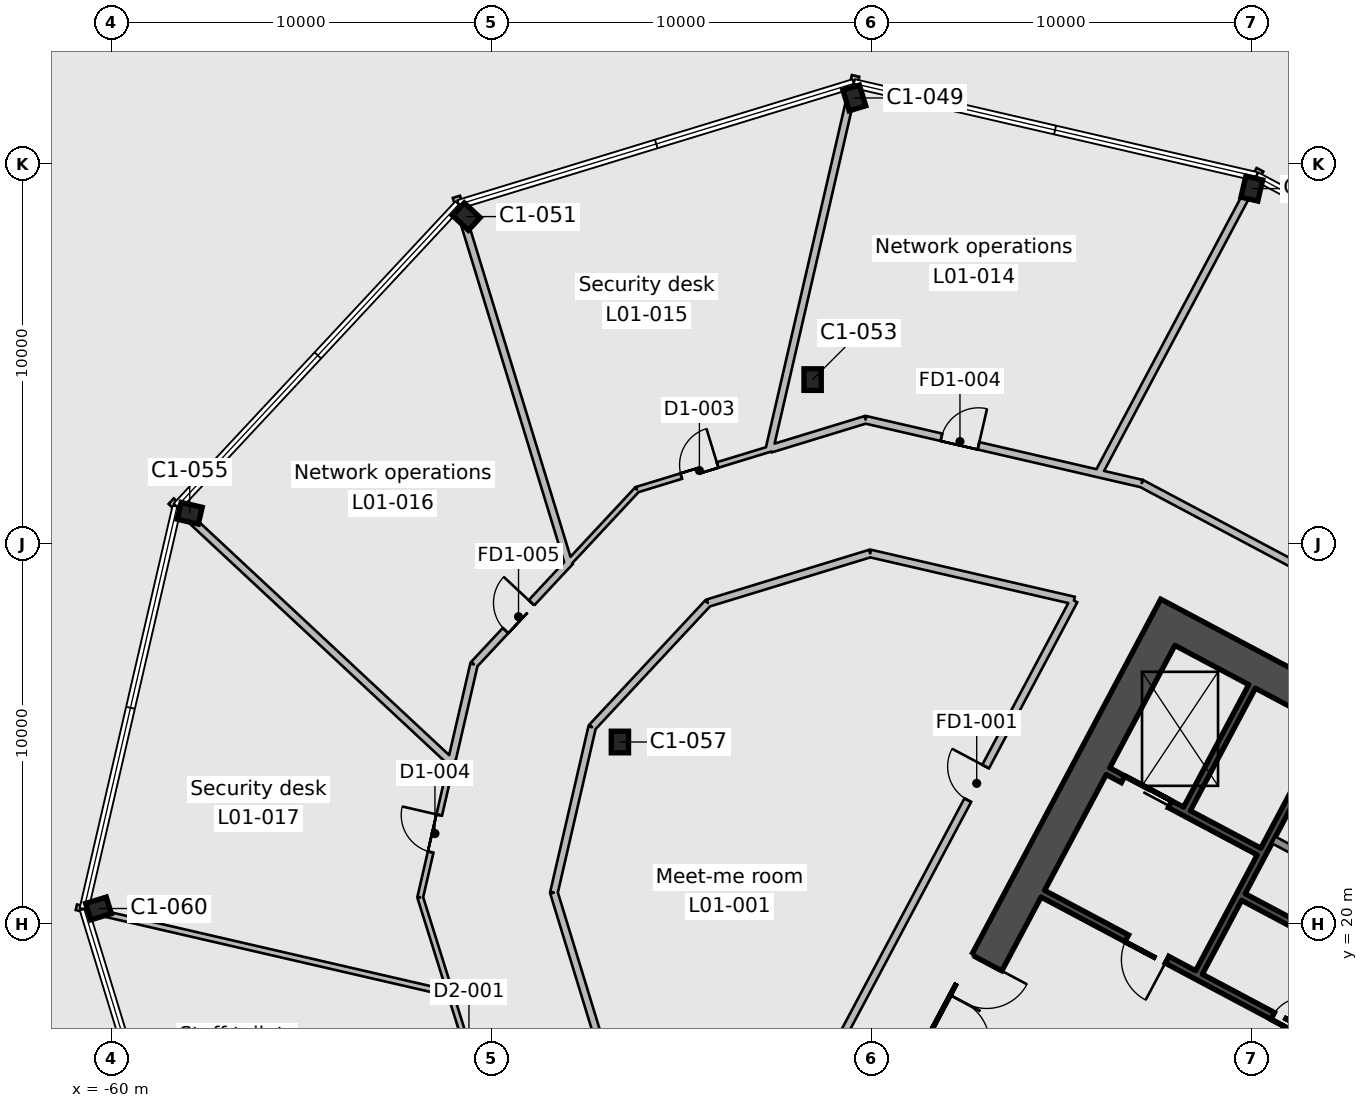
"""IFC4 building model, lengths in metres.
Left out: names, types, materials, properties, quantities, classifications, styles, units other than length and angle.
Written with IfcOpenShell. Run it as: python <this file> out.ifc"""

import sys

from ifc_helpers import new_model, si_unit, direction, frame, frame_2d, origin, origin_2d, place, context, subcontext, project, spatial, rectangle, i_section, extrude, element, fill, save


model = new_model("IFC4")
c1 = context("Model", 3, precision=1e-05, world=origin(), true_north=direction((0.0, 1.0)))
c2 = subcontext(c1, "Body", "Model", "MODEL_VIEW")
j1 = project(units=[si_unit("LENGTHUNIT", "METRE"), si_unit("PLANEANGLEUNIT", "RADIAN")], contexts=[c1])
p1 = place(None, origin())
s1 = spatial("IfcSite", under=j1, at=p1, CompositionType="ELEMENT")
p2 = place(p1, origin())
s2 = spatial("IfcBuilding", under=s1, at=p2, CompositionType="ELEMENT")
p3 = place(p2, frame((0.0, 0.0, 7.0)))
s3 = spatial("IfcBuildingStorey", under=s2, at=p3, CompositionType="ELEMENT", Elevation=7.0)
for number, where, z_axis, x_axis in (
    (1, (-60.34, 20.407, 0.0), (0.0, 0.0, 1.0), (0.292, -0.956, 0.0)),
    (2, (-46.62, 24.788, 0.0), (0.0, 0.0, 1.0), (1.0, 0.0, 0.0)),
    (3, (-57.939, 30.807, 0.0), (0.0, 0.0, 1.0), (-0.225, -0.974, 0.0)),
    (4, (-41.549, 34.324, 0.0), (0.0, 0.0, 1.0), (1.0, 0.0, 0.0)),
    (5, (-50.66, 38.613, 0.0), (0.0, 0.0, 1.0), (-0.682, -0.731, 0.0)),
    (6, (-29.993, 39.35, 0.0), (0.0, 0.0, 1.0), (-0.974, 0.225, 0.0)),
    (7, (-40.452, 41.734, 0.0), (0.0, 0.0, 1.0), (-0.956, -0.292, 0.0)),
):
    element("IfcColumn", number, at=place(p3, frame(where, z_axis=z_axis, x_axis=x_axis)), inside=s3, PredefinedType="COLUMN", context=c2, shape_type="SweptSolid", body=[
        extrude(i_section(OverallWidth=0.455, OverallDepth=0.569, WebThickness=0.078, FlangeThickness=0.125, FilletRadius=0.015, at=origin_2d()), origin(), (0.0, 0.0, 1.0), 5.2),
    ])
p4 = place(p3, frame((-31.992, 28.336, 0.0), z_axis=(0.0, 0.0, 1.0), x_axis=(-0.46947084998, -0.882947971864, 0.0)))
e8 = element("IfcWall", 8, at=p4, inside=s3, PredefinedType="SHEAR", context=c2, shape_type="SweptSolid", body=[
    extrude(rectangle(XDim=20.0, YDim=0.9, at=frame_2d((10.0, 0.0))), origin(), (0.0, 0.0, 1.0), 5.2),
])
p5 = place(p4, frame((10.6, 0.0, 0.0)))
e9 = element("IfcOpeningElement", 9, at=p5, cuts=e8, PredefinedType="OPENING", context=c2, shape_type="SweptSolid", body=[
    extrude(rectangle(XDim=2.4, YDim=2.4, at=frame_2d((1.2, 1.2))), frame((0.0, 0.46, 0.0), z_axis=(0.0, -1.0, 0.0), x_axis=(1.0, 0.0, 0.0)), (0.0, 0.0, 1.0), 0.92),
])
p6 = place(p3, frame((-13.97, 18.244, 0.0), z_axis=(0.0, 0.0, 1.0), x_axis=(-0.88294509198, 0.469476266226, 0.0)))
e10 = element("IfcWall", 10, at=p6, inside=s3, PredefinedType="SHEAR", context=c2, shape_type="SweptSolid", body=[
    extrude(rectangle(XDim=20.2, YDim=0.9, at=frame_2d((10.1, 0.0))), origin(), (0.0, 0.0, 1.0), 5.2),
])
p7 = place(p3, frame((-27.955, 25.171, 0.0), z_axis=(0.0, 0.0, 1.0), x_axis=(-0.469480409012, -0.88294288918, 0.0)))
e11 = element("IfcWall", 11, at=p7, inside=s3, PredefinedType="SHEAR", context=c2, shape_type="SweptSolid", body=[
    extrude(rectangle(XDim=7.3, YDim=0.2, at=frame_2d((3.65, 0.0))), origin(), (0.0, 0.0, 1.0), 5.2),
])
p8 = place(p3, frame((-29.986, 26.25, 0.0), z_axis=(0.0, 0.0, 1.0), x_axis=(-0.469494272526, -0.882935517501, 0.0)))
e12 = element("IfcWall", 12, at=p8, inside=s3, PredefinedType="SHEAR", context=c2, shape_type="SweptSolid", body=[
    extrude(rectangle(XDim=3.65, YDim=0.2, at=frame_2d((1.825, 0.0))), origin(), (0.0, 0.0, 1.0), 5.2),
])
p9 = place(p3, frame((-24.825, 19.769, 0.0), z_axis=(0.0, 0.0, 1.0), x_axis=(-0.882934506056, 0.469496174655, 0.0)))
e13 = element("IfcWall", 13, at=p9, inside=s3, PredefinedType="SOLIDWALL", context=c2, shape_type="SweptSolid", body=[
    extrude(rectangle(XDim=5.2, YDim=0.2, at=frame_2d((2.6, 0.0))), origin(), (0.0, 0.0, 1.0), 5.2),
])
p10 = place(p3, frame((-29.804, 21.906, 0.0), z_axis=(0.0, 0.0, 1.0), x_axis=(-0.882960433586, 0.469447412093, 0.0)))
e14 = element("IfcWall", 14, at=p10, inside=s3, PredefinedType="SHEAR", context=c2, shape_type="SweptSolid", body=[
    extrude(rectangle(XDim=4.5, YDim=0.2, at=frame_2d((2.25, 0.0))), origin(), (0.0, 0.0, 1.0), 5.2),
])
p11 = place(p10, frame((2.65, 0.0, 0.0)))
e15 = element("IfcOpeningElement", 15, at=p11, cuts=e14, PredefinedType="OPENING", context=c2, shape_type="SweptSolid", body=[
    extrude(rectangle(XDim=1.4, YDim=2.4, at=frame_2d((0.7, 1.2))), frame((0.0, 0.11, 0.0), z_axis=(0.0, -1.0, 0.0), x_axis=(1.0, 0.0, 0.0)), (0.0, 0.0, 1.0), 0.22),
])
p12 = place(p3, frame((-25.623, 18.268, 0.0), z_axis=(0.0, 0.0, 1.0), x_axis=(-0.882953967957, 0.469459572775, 0.0)))
e16 = element("IfcWall", 16, at=p12, inside=s3, PredefinedType="SHEAR", context=c2, shape_type="SweptSolid", body=[
    extrude(rectangle(XDim=5.2, YDim=0.2, at=frame_2d((2.6, 0.0))), origin(), (0.0, 0.0, 1.0), 5.2),
])
p13 = place(p3, frame((-26.662, 16.102, 0.0), z_axis=(0.0, 0.0, 1.0), x_axis=(-0.882940221191, 0.469485426614, 0.0)))
e17 = element("IfcWall", 17, at=p13, inside=s3, PredefinedType="SHEAR", context=c2, shape_type="SweptSolid", body=[
    extrude(rectangle(XDim=10.0, YDim=0.2, at=frame_2d((5.0, 0.0))), origin(), (0.0, 0.0, 1.0), 5.2),
])
p14 = place(p13, frame((6.3, 0.0, 0.0)))
e18 = element("IfcOpeningElement", 18, at=p14, cuts=e17, PredefinedType="OPENING", context=c2, shape_type="SweptSolid", body=[
    extrude(rectangle(XDim=1.2, YDim=2.1, at=frame_2d((0.6, 1.05))), frame((0.0, 0.11, 0.0), z_axis=(0.0, -1.0, 0.0), x_axis=(1.0, 0.0, 0.0)), (0.0, 0.0, 1.0), 0.22),
])
p15 = place(p13, frame((2.25, 0.0, 0.0)))
e19 = element("IfcOpeningElement", 19, at=p15, cuts=e17, PredefinedType="OPENING", context=c2, shape_type="SweptSolid", body=[
    extrude(rectangle(XDim=0.9, YDim=2.1, at=frame_2d((0.45, 1.05))), frame((0.0, 0.11, 0.0), z_axis=(0.0, -1.0, 0.0), x_axis=(1.0, 0.0, 0.0)), (0.0, 0.0, 1.0), 0.22),
])
p16 = place(p3, frame((-51.08, 18.168, 0.0), z_axis=(0.0, 0.0, 1.0), x_axis=(-0.974375306075, 0.224928350615, 0.0)))
e20 = element("IfcWall", 20, at=p16, inside=s3, PredefinedType="PARTITIONING", context=c2, shape_type="SweptSolid", body=[
    extrude(rectangle(XDim=10.101, YDim=0.15, at=frame_2d((5.05, 0.0))), origin(), (0.0, 0.0, 1.0), 4.75),
])
p17 = place(p3, frame((-58.427, 31.125, 0.0), z_axis=(0.0, 0.0, 1.0), x_axis=(0.731473963822, -0.681869371838, 0.0)))
e21 = element("IfcWall", 21, at=p17, inside=s3, PredefinedType="PARTITIONING", context=c2, shape_type="SweptSolid", body=[
    extrude(rectangle(XDim=10.08, YDim=0.2, at=frame_2d((5.04, 0.0))), origin(), (0.0, 0.0, 1.0), 4.75),
])
p18 = place(p3, frame((-51.041, 24.311, 0.0), z_axis=(0.0, 0.0, 1.0), x_axis=(-0.224893203367, -0.974383418927, 0.0)))
e22 = element("IfcWall", 22, at=p18, inside=s3, PredefinedType="PARTITIONING", context=c2, shape_type="SweptSolid", body=[
    extrude(rectangle(XDim=3.704, YDim=0.15, at=frame_2d((1.852, 0.0))), origin(), (0.0, 0.0, 1.0), 4.75),
])
p19 = place(p18, frame((1.482, 0.0, 0.0)))
e23 = element("IfcOpeningElement", 23, at=p19, cuts=e22, PredefinedType="OPENING", context=c2, shape_type="SweptSolid", body=[
    extrude(rectangle(XDim=1.0, YDim=2.1, at=frame_2d((0.5, 1.05))), frame((0.0, 0.085, 0.0), z_axis=(0.0, -1.0, 0.0), x_axis=(1.0, 0.0, 0.0)), (0.0, 0.0, 1.0), 0.17),
])
p20 = place(p3, frame((-51.874, 20.702, 0.0), z_axis=(0.0, 0.0, 1.0), x_axis=(0.299019355328, -0.954247046178, 0.0)))
e24 = element("IfcWall", 24, at=p20, inside=s3, PredefinedType="PARTITIONING", context=c2, shape_type="SweptSolid", body=[
    extrude(rectangle(XDim=2.595, YDim=0.15, at=frame_2d((1.298, 0.0))), origin(), (0.0, 0.0, 1.0), 4.75),
])
p21 = place(p3, frame((-49.847, 14.234, 0.0), z_axis=(0.0, 0.0, 1.0), x_axis=(-0.29896287329, 0.954264743346, 0.0)))
e25 = element("IfcWall", 25, at=p21, inside=s3, PredefinedType="PARTITIONING", context=c2, shape_type="SweptSolid", body=[
    extrude(rectangle(XDim=4.183, YDim=0.15, at=frame_2d((2.091, 0.0))), origin(), (0.0, 0.0, 1.0), 4.75),
])
p22 = place(p21, frame((2.015, 0.0, 0.0)))
e26 = element("IfcOpeningElement", 26, at=p22, cuts=e25, PredefinedType="OPENING", context=c2, shape_type="SweptSolid", body=[
    extrude(rectangle(XDim=0.95, YDim=2.1, at=frame_2d((0.475, 1.05))), frame((0.0, 0.085, 0.0), z_axis=(0.0, -1.0, 0.0), x_axis=(1.0, 0.0, 0.0)), (0.0, 0.0, 1.0), 0.17),
])
p23 = place(p3, frame((-47.933, 29.538, 0.0), z_axis=(0.0, 0.0, 1.0), x_axis=(-0.682088017664, -0.731270084277, 0.0)))
e27 = element("IfcWall", 27, at=p23, inside=s3, PredefinedType="PARTITIONING", context=c2, shape_type="SweptSolid", body=[
    extrude(rectangle(XDim=3.703, YDim=0.2, at=frame_2d((1.852, 0.0))), origin(), (0.0, 0.0, 1.0), 4.75),
])
p24 = place(p23, frame((1.486, 0.0, 0.0)))
e28 = element("IfcOpeningElement", 28, at=p24, cuts=e27, PredefinedType="OPENING", context=c2, shape_type="SweptSolid", body=[
    extrude(rectangle(XDim=1.0, YDim=2.1, at=frame_2d((0.5, 1.05))), frame((0.0, 0.11, 0.0), z_axis=(0.0, -1.0, 0.0), x_axis=(1.0, 0.0, 0.0)), (0.0, 0.0, 1.0), 0.22),
])
p25 = place(p3, frame((-50.459, 26.83, 0.0), z_axis=(0.0, 0.0, 1.0), x_axis=(-0.225121568864, -0.974330682691, 0.0)))
e29 = element("IfcWall", 29, at=p25, inside=s3, PredefinedType="PARTITIONING", context=c2, shape_type="SweptSolid", body=[
    extrude(rectangle(XDim=2.585, YDim=0.2, at=frame_2d((1.293, 0.0))), origin(), (0.0, 0.0, 1.0), 4.75),
])
p26 = place(p3, frame((-50.922, 39.133, 0.0), z_axis=(0.0, 0.0, 1.0), x_axis=(0.292463432429, -0.956276707178, 0.0)))
e30 = element("IfcWall", 30, at=p26, inside=s3, PredefinedType="PARTITIONING", context=c2, shape_type="SweptSolid", body=[
    extrude(rectangle(XDim=10.08, YDim=0.2, at=frame_2d((5.04, 0.0))), origin(), (0.0, 0.0, 1.0), 4.75),
])
p27 = place(p3, frame((-48.138, 21.768, 0.0), z_axis=(0.0, 0.0, 1.0), x_axis=(0.224910471472, 0.974379433189, 0.0)))
e31 = element("IfcWall", 31, at=p27, inside=s3, PredefinedType="PARTITIONING", context=c2, shape_type="SweptSolid", body=[
    extrude(rectangle(XDim=3.499, YDim=0.2, at=frame_2d((1.749, 0.0))), origin(), (0.0, 0.0, 1.0), 4.75),
])
p28 = place(p3, frame((-47.351, 25.177, 0.0), z_axis=(0.0, 0.0, 1.0), x_axis=(0.681950982626, 0.731397878925, 0.0)))
e32 = element("IfcWall", 32, at=p28, inside=s3, PredefinedType="PARTITIONING", context=c2, shape_type="SweptSolid", body=[
    extrude(rectangle(XDim=2.464, YDim=0.2, at=frame_2d((1.232, 0.0))), origin(), (0.0, 0.0, 1.0), 4.75),
])
p29 = place(p3, frame((-47.05, 16.554, 0.0), z_axis=(0.0, 0.0, 1.0), x_axis=(-0.292399072869, 0.956296388253, 0.0)))
e33 = element("IfcWall", 33, at=p29, inside=s3, PredefinedType="PARTITIONING", context=c2, shape_type="SweptSolid", body=[
    extrude(rectangle(XDim=4.466, YDim=0.2, at=frame_2d((2.233, 0.0))), origin(), (0.0, 0.0, 1.0), 4.75),
])
p30 = place(p3, frame((-48.356, 20.825, 0.0), z_axis=(0.0, 0.0, 1.0), x_axis=(0.225227894395, 0.974306109796, 0.0)))
e34 = element("IfcWall", 34, at=p30, inside=s3, PredefinedType="PARTITIONING", context=c2, shape_type="SweptSolid", body=[
    extrude(rectangle(XDim=0.968, YDim=0.2, at=frame_2d((0.484, 0.0))), origin(), (0.0, 0.0, 1.0), 4.75),
])
p31 = place(p3, frame((-42.653, 32.504, 0.0), z_axis=(0.0, 0.0, 1.0), x_axis=(-0.95632425254, -0.292307926687, 0.0)))
e35 = element("IfcWall", 35, at=p31, inside=s3, PredefinedType="PARTITIONING", context=c2, shape_type="SweptSolid", body=[
    extrude(rectangle(XDim=3.677, YDim=0.15, at=frame_2d((1.839, 0.0))), origin(), (0.0, 0.0, 1.0), 4.75),
])
p32 = place(p31, frame((1.461, 0.0, 0.0)))
e36 = element("IfcOpeningElement", 36, at=p32, cuts=e35, PredefinedType="OPENING", context=c2, shape_type="SweptSolid", body=[
    extrude(rectangle(XDim=1.0, YDim=2.1, at=frame_2d((0.5, 1.05))), frame((0.0, 0.085, 0.0), z_axis=(0.0, -1.0, 0.0), x_axis=(1.0, 0.0, 0.0)), (0.0, 0.0, 1.0), 0.17),
])
p33 = place(p3, frame((-46.17, 31.429, 0.0), z_axis=(0.0, 0.0, 1.0), x_axis=(-0.68198172509, -0.731369213628, 0.0)))
e37 = element("IfcWall", 37, at=p33, inside=s3, PredefinedType="PARTITIONING", context=c2, shape_type="SweptSolid", body=[
    extrude(rectangle(XDim=2.585, YDim=0.15, at=frame_2d((1.293, 0.0))), origin(), (0.0, 0.0, 1.0), 4.75),
])
p34 = place(p3, frame((-40.034, 29.749, 0.0), z_axis=(0.0, 0.0, 1.0), x_axis=(-0.956357512161, -0.29219909126, 0.0)))
e38 = element("IfcWall", 38, at=p34, inside=s3, PredefinedType="PARTITIONING", context=c2, shape_type="SweptSolid", body=[
    extrude(rectangle(XDim=4.466, YDim=0.2, at=frame_2d((2.233, 0.0))), origin(), (0.0, 0.0, 1.0), 4.75),
])
p35 = place(p3, frame((-44.305, 28.444, 0.0), z_axis=(0.0, 0.0, 1.0), x_axis=(-0.681931663517, -0.731415891469, 0.0)))
e39 = element("IfcWall", 39, at=p35, inside=s3, PredefinedType="PARTITIONING", context=c2, shape_type="SweptSolid", body=[
    extrude(rectangle(XDim=2.003, YDim=0.2, at=frame_2d((1.001, 0.0))), origin(), (0.0, 0.0, 1.0), 4.75),
])
p36 = place(p3, frame((-39.826, 18.82, 0.0), z_axis=(0.0, 0.0, 1.0), x_axis=(-0.469481685648, -0.882942210363, 0.0)))
e40 = element("IfcWall", 40, at=p36, inside=s3, PredefinedType="PARTITIONING", context=c2, shape_type="SweptSolid", body=[
    extrude(rectangle(XDim=6.816, YDim=0.2, at=frame_2d((3.408, 0.0))), origin(), (0.0, 0.0, 1.0), 4.75),
])
p37 = place(p3, frame((-40.419, 42.315, 0.0), z_axis=(0.0, 0.0, 1.0), x_axis=(-0.224924959868, -0.974376088802, 0.0)))
e41 = element("IfcWall", 41, at=p37, inside=s3, PredefinedType="PARTITIONING", context=c2, shape_type="SweptSolid", body=[
    extrude(rectangle(XDim=10.079, YDim=0.2, at=frame_2d((5.04, 0.0))), origin(), (0.0, 0.0, 1.0), 4.75),
])
p38 = place(p3, frame((-40.156, 33.267, 0.0), z_axis=(0.0, 0.0, 1.0), x_axis=(-0.956331245239, -0.292285048164, 0.0)))
e42 = element("IfcWall", 42, at=p38, inside=s3, PredefinedType="PARTITIONING", context=c2, shape_type="SweptSolid", body=[
    extrude(rectangle(XDim=2.611, YDim=0.2, at=frame_2d((1.306, 0.0))), origin(), (0.0, 0.0, 1.0), 4.75),
])
p39 = place(p3, frame((-40.157, 33.267, 0.0), z_axis=(0.0, 0.0, 1.0), x_axis=(0.974407195754, -0.224790161846, 0.0)))
e43 = element("IfcWall", 43, at=p39, inside=s3, PredefinedType="PARTITIONING", context=c2, shape_type="SweptSolid", body=[
    extrude(rectangle(XDim=5.143, YDim=0.2, at=frame_2d((2.571, 0.0))), origin(), (0.0, 0.0, 1.0), 4.75),
])
p40 = place(p39, frame((2.05, 0.0, 0.0)))
e44 = element("IfcOpeningElement", 44, at=p40, cuts=e43, PredefinedType="OPENING", context=c2, shape_type="SweptSolid", body=[
    extrude(rectangle(XDim=1.0, YDim=2.1, at=frame_2d((0.5, 1.05))), frame((0.0, 0.11, 0.0), z_axis=(0.0, -1.0, 0.0), x_axis=(1.0, 0.0, 0.0)), (0.0, 0.0, 1.0), 0.22),
])
p41 = place(p3, frame((-34.673, 28.512, 0.0), z_axis=(0.0, 0.0, 1.0), x_axis=(-0.974393439342, 0.224849784003, 0.0)))
e45 = element("IfcWall", 45, at=p41, inside=s3, PredefinedType="PARTITIONING", context=c2, shape_type="SweptSolid", body=[
    extrude(rectangle(XDim=5.502, YDim=0.2, at=frame_2d((2.751, 0.0))), origin(), (0.0, 0.0, 1.0), 4.75),
])
p42 = place(p3, frame((-34.673, 28.512, 0.0), z_axis=(0.0, 0.0, 1.0), x_axis=(-0.469440333182, -0.882964197226, 0.0)))
e46 = element("IfcWall", 46, at=p42, inside=s3, PredefinedType="PARTITIONING", context=c2, shape_type="SweptSolid", body=[
    extrude(rectangle(XDim=10.977, YDim=0.2, at=frame_2d((5.488, 0.0))), origin(), (0.0, 0.0, 1.0), 4.75),
])
p43 = place(p42, frame((4.95, 0.0, 0.0)))
e47 = element("IfcOpeningElement", 47, at=p43, cuts=e46, PredefinedType="OPENING", context=c2, shape_type="SweptSolid", body=[
    extrude(rectangle(XDim=1.0, YDim=2.1, at=frame_2d((0.5, 1.05))), frame((0.0, 0.11, 0.0), z_axis=(0.0, -1.0, 0.0), x_axis=(1.0, 0.0, 0.0)), (0.0, 0.0, 1.0), 0.22),
])
p44 = place(p3, frame((-35.146, 32.111, 0.0), z_axis=(0.0, 0.0, 1.0), x_axis=(0.974164552701, -0.225839377125, 0.0)))
e48 = element("IfcWall", 48, at=p44, inside=s3, PredefinedType="PARTITIONING", context=c2, shape_type="SweptSolid", body=[
    extrude(rectangle(XDim=1.183, YDim=0.2, at=frame_2d((0.591, 0.0))), origin(), (0.0, 0.0, 1.0), 4.75),
])
p45 = place(p3, frame((-29.779, 39.846, 0.0), z_axis=(0.0, 0.0, 1.0), x_axis=(-0.469479235169, -0.882943513338, 0.0)))
e49 = element("IfcWall", 49, at=p45, inside=s3, PredefinedType="PARTITIONING", context=c2, shape_type="SweptSolid", body=[
    extrude(rectangle(XDim=9.052, YDim=0.2, at=frame_2d((4.526, 0.0))), origin(), (0.0, 0.0, 1.0), 4.75),
])
p46 = place(p3, frame((-32.894, 31.59, 0.0), z_axis=(0.0, 0.0, 1.0), x_axis=(-0.97437296606, 0.22493848717, 0.0)))
e50 = element("IfcWall", 50, at=p46, inside=s3, PredefinedType="PARTITIONING", context=c2, shape_type="SweptSolid", body=[
    extrude(rectangle(XDim=1.129, YDim=0.2, at=frame_2d((0.564, 0.0))), origin(), (0.0, 0.0, 1.0), 4.75),
])
p47 = place(p3, frame((-32.894, 31.59, 0.0), z_axis=(0.0, 0.0, 1.0), x_axis=(0.882948512555, -0.469469833085, 0.0)))
e51 = element("IfcWall", 51, at=p47, inside=s3, PredefinedType="PARTITIONING", context=c2, shape_type="SweptSolid", body=[
    extrude(rectangle(XDim=37.255, YDim=0.2, at=frame_2d((18.627, 0.0))), origin(), (0.0, 0.0, 1.0), 4.75),
])
p48 = place(p47, frame((21.55, 0.0, 0.0)))
e52 = element("IfcOpeningElement", 52, at=p48, cuts=e51, PredefinedType="OPENING", context=c2, shape_type="SweptSolid", body=[
    extrude(rectangle(XDim=1.0, YDim=2.1, at=frame_2d((0.5, 1.05))), frame((0.0, 0.11, 0.0), z_axis=(0.0, -1.0, 0.0), x_axis=(1.0, 0.0, 0.0)), (0.0, 0.0, 1.0), 0.22),
])
p49 = place(p47, frame((18.15, 0.0, 0.0)))
e53 = element("IfcOpeningElement", 53, at=p49, cuts=e51, PredefinedType="OPENING", context=c2, shape_type="SweptSolid", body=[
    extrude(rectangle(XDim=1.0, YDim=2.1, at=frame_2d((0.5, 1.05))), frame((0.0, 0.11, 0.0), z_axis=(0.0, -1.0, 0.0), x_axis=(1.0, 0.0, 0.0)), (0.0, 0.0, 1.0), 0.22),
])
p50 = place(p5, origin())
e54 = element("IfcDoor", 54, at=p50, inside=s3, OperationType="DOUBLE_DOOR_SINGLE_SWING", PredefinedType="DOOR", context=c2, shape_type="SweptSolid", body=[
    extrude(rectangle(XDim=2.4, YDim=2.4, at=frame_2d((1.2, 1.2))), frame((0.0, 0.025, 0.0), z_axis=(0.0, -1.0, 0.0), x_axis=(1.0, 0.0, 0.0)), (0.0, 0.0, 1.0), 0.05),
])
fill(e9, e54)
p51 = place(p14, origin())
e55 = element("IfcDoor", 55, at=p51, inside=s3, OperationType="SINGLE_SWING_LEFT", PredefinedType="DOOR", context=c2, shape_type="SweptSolid", body=[
    extrude(rectangle(XDim=1.2, YDim=2.1, at=frame_2d((0.6, 1.05))), frame((0.0, 0.025, 0.0), z_axis=(0.0, -1.0, 0.0), x_axis=(1.0, 0.0, 0.0)), (0.0, 0.0, 1.0), 0.05),
])
fill(e18, e55)
p52 = place(p15, frame((0.9, 0.0, 0.0), z_axis=(0.0, 0.0, 1.0), x_axis=(-1.0, 0.0, 0.0)))
e56 = element("IfcDoor", 56, at=p52, inside=s3, OperationType="SINGLE_SWING_RIGHT", PredefinedType="DOOR", context=c2, shape_type="SweptSolid", body=[
    extrude(rectangle(XDim=0.9, YDim=2.1, at=frame_2d((0.45, 1.05))), frame((0.0, 0.025, 0.0), z_axis=(0.0, -1.0, 0.0), x_axis=(1.0, 0.0, 0.0)), (0.0, 0.0, 1.0), 0.05),
])
fill(e19, e56)
p53 = place(p11, origin())
e57 = element("IfcDoor", 57, at=p53, inside=s3, OperationType="DOUBLE_DOOR_SLIDING", PredefinedType="DOOR", context=c2, shape_type="SweptSolid", body=[
    extrude(rectangle(XDim=1.4, YDim=2.4, at=frame_2d((0.7, 1.2))), frame((0.0, 0.025, 0.0), z_axis=(0.0, -1.0, 0.0), x_axis=(1.0, 0.0, 0.0)), (0.0, 0.0, 1.0), 0.05),
])
fill(e15, e57)
p54 = place(p43, frame((1.0, 0.0, 0.0), z_axis=(0.0, 0.0, 1.0), x_axis=(-1.0, 0.0, 0.0)))
e58 = element("IfcDoor", 58, at=p54, inside=s3, OperationType="SINGLE_SWING_RIGHT", PredefinedType="DOOR", context=c2, shape_type="SweptSolid", body=[
    extrude(rectangle(XDim=1.0, YDim=2.1, at=frame_2d((0.5, 1.05))), frame((0.0, 0.025, 0.0), z_axis=(0.0, -1.0, 0.0), x_axis=(1.0, 0.0, 0.0)), (0.0, 0.0, 1.0), 0.05),
])
fill(e47, e58)
p55 = place(p40, origin())
e59 = element("IfcDoor", 59, at=p55, inside=s3, OperationType="SINGLE_SWING_RIGHT", PredefinedType="DOOR", context=c2, shape_type="SweptSolid", body=[
    extrude(rectangle(XDim=1.0, YDim=2.1, at=frame_2d((0.5, 1.05))), frame((0.0, 0.025, 0.0), z_axis=(0.0, -1.0, 0.0), x_axis=(1.0, 0.0, 0.0)), (0.0, 0.0, 1.0), 0.05),
])
fill(e44, e59)
p56 = place(p32, frame((1.0, 0.0, 0.0), z_axis=(0.0, 0.0, 1.0), x_axis=(-1.0, 0.0, 0.0)))
e60 = element("IfcDoor", 60, at=p56, inside=s3, OperationType="SINGLE_SWING_RIGHT", PredefinedType="DOOR", context=c2, shape_type="SweptSolid", body=[
    extrude(rectangle(XDim=1.0, YDim=2.1, at=frame_2d((0.5, 1.05))), frame((0.0, 0.025, 0.0), z_axis=(0.0, -1.0, 0.0), x_axis=(1.0, 0.0, 0.0)), (0.0, 0.0, 1.0), 0.05),
])
fill(e36, e60)
p57 = place(p24, frame((1.0, 0.0, 0.0), z_axis=(0.0, 0.0, 1.0), x_axis=(-1.0, 0.0, 0.0)))
e61 = element("IfcDoor", 61, at=p57, inside=s3, OperationType="SINGLE_SWING_RIGHT", PredefinedType="DOOR", context=c2, shape_type="SweptSolid", body=[
    extrude(rectangle(XDim=1.0, YDim=2.1, at=frame_2d((0.5, 1.05))), frame((0.0, 0.025, 0.0), z_axis=(0.0, -1.0, 0.0), x_axis=(1.0, 0.0, 0.0)), (0.0, 0.0, 1.0), 0.05),
])
fill(e28, e61)
p58 = place(p19, frame((1.0, 0.0, 0.0), z_axis=(0.0, 0.0, 1.0), x_axis=(-1.0, 0.0, 0.0)))
e62 = element("IfcDoor", 62, at=p58, inside=s3, OperationType="SINGLE_SWING_RIGHT", PredefinedType="DOOR", context=c2, shape_type="SweptSolid", body=[
    extrude(rectangle(XDim=1.0, YDim=2.1, at=frame_2d((0.5, 1.05))), frame((0.0, 0.025, 0.0), z_axis=(0.0, -1.0, 0.0), x_axis=(1.0, 0.0, 0.0)), (0.0, 0.0, 1.0), 0.05),
])
fill(e23, e62)
save(model, sys.argv[1])
